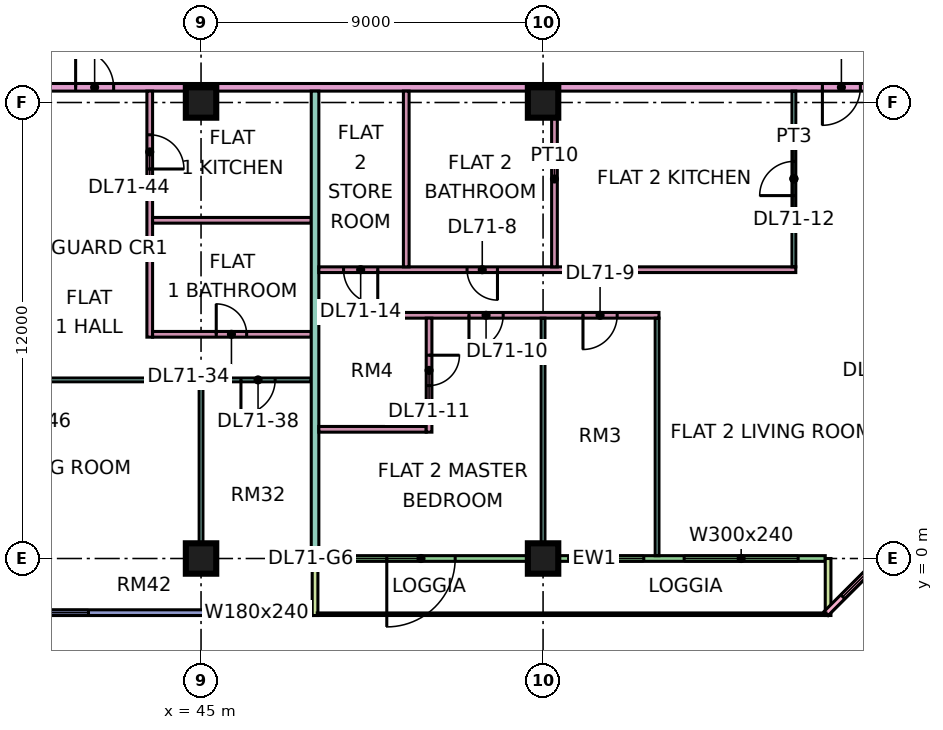
"""IFC4 building model, lengths in metres.
Left out: names, types, materials, properties, quantities, classifications, styles, units other than length and angle.
Written with IfcOpenShell. Run it as: python <this file> out.ifc"""

import sys

from ifc_helpers import new_model, si_unit, direction, frame, frame_2d, origin, origin_2d, place, context, subcontext, project, spatial, rectangle, extrude, element, fill, save


model = new_model("IFC4")
c1 = context("Model", 3, precision=1e-05, world=origin(), true_north=direction((0.0, 1.0)))
c2 = subcontext(c1, "Body", "Model", "MODEL_VIEW")
j1 = project(units=[si_unit("LENGTHUNIT", "METRE"), si_unit("PLANEANGLEUNIT", "RADIAN")], contexts=[c1])
p1 = place(None, origin())
s1 = spatial("IfcSite", under=j1, at=p1, CompositionType="ELEMENT")
p2 = place(p1, origin())
s2 = spatial("IfcBuilding", under=s1, at=p2, CompositionType="ELEMENT")
p3 = place(p2, frame((0.0, 0.0, 303.4)))
s3 = spatial("IfcBuildingStorey", under=s2, at=p3, CompositionType="ELEMENT", Elevation=303.4)
for number, where, z_axis, x_axis in (
    (1, (45.0, 0.0, 0.0), (0.0, 0.0, 1.0), (1.0, 0.0, 0.0)),
    (2, (45.0, 12.0, 0.0), (0.0, 0.0, 1.0), (1.0, 0.0, 0.0)),
    (3, (54.0, 0.0, 0.0), (0.0, 0.0, 1.0), (1.0, 0.0, 0.0)),
    (4, (54.0, 12.0, 0.0), (0.0, 0.0, 1.0), (1.0, 0.0, 0.0)),
):
    element("IfcColumn", number, at=place(p3, frame(where, z_axis=z_axis, x_axis=x_axis)), inside=s3, PredefinedType="COLUMN", context=c2, shape_type="SweptSolid", body=[
        extrude(rectangle(XDim=0.8, YDim=0.8, at=origin_2d()), origin(), (0.0, 0.0, 1.0), 3.75),
    ])
p4 = place(p3, frame((36.075, -1.425, 0.0), z_axis=(0.0, 0.0, 1.0), x_axis=(1.0, 0.0, 0.0)))
e5 = element("IfcWall", 5, at=p4, inside=s3, PredefinedType="SOLIDWALL", context=c2, shape_type="SweptSolid", body=[
    extrude(rectangle(XDim=11.85, YDim=0.15, at=frame_2d((5.925, 0.0))), origin(), (0.0, 0.0, 1.0), 3.35),
])
p5 = place(p4, frame((2.962, 0.0, 0.45)))
e6 = element("IfcOpeningElement", 6, at=p5, cuts=e5, PredefinedType="OPENING", context=c2, shape_type="SweptSolid", body=[
    extrude(rectangle(XDim=3.0, YDim=2.4, at=frame_2d((1.5, 1.2))), frame((0.0, 0.085, 0.0), z_axis=(0.0, -1.0, 0.0), x_axis=(1.0, 0.0, 0.0)), (0.0, 0.0, 1.0), 0.17),
])
p6 = place(p4, frame((9.488, 0.0, 0.45)))
e7 = element("IfcOpeningElement", 7, at=p6, cuts=e5, PredefinedType="OPENING", context=c2, shape_type="SweptSolid", body=[
    extrude(rectangle(XDim=1.8, YDim=2.4, at=frame_2d((0.9, 1.2))), frame((0.0, 0.085, 0.0), z_axis=(0.0, -1.0, 0.0), x_axis=(1.0, 0.0, 0.0)), (0.0, 0.0, 1.0), 0.17),
])
p7 = place(p3, frame((48.075, 0.0, 0.0), z_axis=(0.0, 0.0, 1.0), x_axis=(1.0, 0.0, 0.0)))
e8 = element("IfcWall", 8, at=p7, inside=s3, PredefinedType="SOLIDWALL", context=c2, shape_type="SweptSolid", body=[
    extrude(rectangle(XDim=13.35, YDim=0.15, at=frame_2d((6.675, 0.0))), origin(), (0.0, 0.0, 1.0), 3.35),
])
p8 = place(p7, frame((1.812, 0.0, 0.0)))
e9 = element("IfcOpeningElement", 9, at=p8, cuts=e8, PredefinedType="OPENING", context=c2, shape_type="SweptSolid", body=[
    extrude(rectangle(XDim=1.8, YDim=2.4, at=frame_2d((0.9, 1.2))), frame((0.0, 0.085, 0.0), z_axis=(0.0, -1.0, 0.0), x_axis=(1.0, 0.0, 0.0)), (0.0, 0.0, 1.0), 0.17),
])
p9 = place(p7, frame((6.775, 0.0, 0.45)))
e10 = element("IfcOpeningElement", 10, at=p9, cuts=e8, PredefinedType="OPENING", context=c2, shape_type="SweptSolid", body=[
    extrude(rectangle(XDim=1.8, YDim=2.4, at=frame_2d((0.9, 1.2))), frame((0.0, 0.085, 0.0), z_axis=(0.0, -1.0, 0.0), x_axis=(1.0, 0.0, 0.0)), (0.0, 0.0, 1.0), 0.17),
])
p10 = place(p7, frame((9.637, 0.0, 0.45)))
e11 = element("IfcOpeningElement", 11, at=p10, cuts=e8, PredefinedType="OPENING", context=c2, shape_type="SweptSolid", body=[
    extrude(rectangle(XDim=3.0, YDim=2.4, at=frame_2d((1.5, 1.2))), frame((0.0, 0.085, 0.0), z_axis=(0.0, -1.0, 0.0), x_axis=(1.0, 0.0, 0.0)), (0.0, 0.0, 1.0), 0.17),
])
for number, where, z_axis, x_axis in (
    (12, (48.0, -1.5, 0.0), (0.0, 0.0, 1.0), (0.0, 1.0, 0.0)),
    (13, (61.5, -1.5, 0.0), (0.0, 0.0, 1.0), (0.0, 1.0, 0.0)),
):
    element("IfcWall", number, at=place(p3, frame(where, z_axis=z_axis, x_axis=x_axis)), inside=s3, PredefinedType="SOLIDWALL", context=c2, shape_type="SweptSolid", body=[
        extrude(rectangle(XDim=1.5, YDim=0.15, at=frame_2d((0.75, 0.0))), origin(), (0.0, 0.0, 1.0), 3.35),
    ])
p11 = place(p3, frame((61.447, -1.447, 0.0), z_axis=(0.0, 0.0, 1.0), x_axis=(0.707106781187, 0.707106781187, 0.0)))
e14 = element("IfcWall", 14, at=p11, inside=s3, PredefinedType="SOLIDWALL", context=c2, shape_type="SweptSolid", body=[
    extrude(rectangle(XDim=4.243, YDim=0.15, at=frame_2d((2.121, 0.0))), origin(), (0.0, 0.0, 1.0), 3.35),
])
p12 = place(p11, frame((0.621, 0.0, 0.45)))
e15 = element("IfcOpeningElement", 15, at=p12, cuts=e14, PredefinedType="OPENING", context=c2, shape_type="SweptSolid", body=[
    extrude(rectangle(XDim=3.0, YDim=2.4, at=frame_2d((1.5, 1.2))), frame((0.0, 0.085, 0.0), z_axis=(0.0, -1.0, 0.0), x_axis=(1.0, 0.0, 0.0)), (0.0, 0.0, 1.0), 0.17),
])
p13 = place(p3, frame((33.05, 4.7, 0.0), z_axis=(0.0, 0.0, 1.0), x_axis=(1.0, 0.0, 0.0)))
e16 = element("IfcWall", 16, at=p13, inside=s3, PredefinedType="PARTITIONING", context=c2, shape_type="SweptSolid", body=[
    extrude(rectangle(XDim=14.85, YDim=0.1, at=frame_2d((7.425, 0.0))), origin(), (0.0, 0.0, 1.0), 3.35),
])
p14 = place(p13, frame((1.0, 0.0, 0.0)))
e17 = element("IfcOpeningElement", 17, at=p14, cuts=e16, PredefinedType="OPENING", context=c2, shape_type="SweptSolid", body=[
    extrude(rectangle(XDim=0.9, YDim=2.1, at=frame_2d((0.45, 1.05))), frame((0.0, 0.06, 0.0), z_axis=(0.0, -1.0, 0.0), x_axis=(1.0, 0.0, 0.0)), (0.0, 0.0, 1.0), 0.12),
])
p15 = place(p13, frame((13.0, 0.0, 0.0)))
e18 = element("IfcOpeningElement", 18, at=p15, cuts=e16, PredefinedType="OPENING", context=c2, shape_type="SweptSolid", body=[
    extrude(rectangle(XDim=0.9, YDim=2.1, at=frame_2d((0.45, 1.05))), frame((0.0, 0.06, 0.0), z_axis=(0.0, -1.0, 0.0), x_axis=(1.0, 0.0, 0.0)), (0.0, 0.0, 1.0), 0.12),
])
p16 = place(p13, frame((7.0, 0.0, 0.0)))
e19 = element("IfcOpeningElement", 19, at=p16, cuts=e16, PredefinedType="OPENING", context=c2, shape_type="SweptSolid", body=[
    extrude(rectangle(XDim=0.9, YDim=2.1, at=frame_2d((0.45, 1.05))), frame((0.0, 0.06, 0.0), z_axis=(0.0, -1.0, 0.0), x_axis=(1.0, 0.0, 0.0)), (0.0, 0.0, 1.0), 0.12),
])
p17 = place(p3, frame((40.65, 12.4, 0.0), z_axis=(0.0, 0.0, 1.0), x_axis=(1.0, 0.0, 0.0)))
e20 = element("IfcWall", 20, at=p17, inside=s3, PredefinedType="PARTITIONING", context=c2, shape_type="SweptSolid", body=[
    extrude(rectangle(XDim=22.35, YDim=0.2, at=frame_2d((11.175, 0.0))), origin(), (0.0, 0.0, 1.0), 3.35),
])
p18 = place(p17, frame((20.7, 0.0, 0.0)))
e21 = element("IfcOpeningElement", 21, at=p18, cuts=e20, PredefinedType="OPENING", context=c2, shape_type="SweptSolid", body=[
    extrude(rectangle(XDim=1.0, YDim=2.1, at=frame_2d((0.5, 1.05))), frame((0.0, 0.11, 0.0), z_axis=(0.0, -1.0, 0.0), x_axis=(1.0, 0.0, 0.0)), (0.0, 0.0, 1.0), 0.22),
])
p19 = place(p17, frame((1.05, 0.0, 0.0)))
e22 = element("IfcOpeningElement", 22, at=p19, cuts=e20, PredefinedType="OPENING", context=c2, shape_type="SweptSolid", body=[
    extrude(rectangle(XDim=1.0, YDim=2.1, at=frame_2d((0.5, 1.05))), frame((0.0, 0.11, 0.0), z_axis=(0.0, -1.0, 0.0), x_axis=(1.0, 0.0, 0.0)), (0.0, 0.0, 1.0), 0.22),
])
p20 = place(p3, frame((43.65, 5.825, 0.0), z_axis=(0.0, 0.0, 1.0), x_axis=(0.0, 1.0, 0.0)))
e23 = element("IfcWall", 23, at=p20, inside=s3, PredefinedType="PARTITIONING", context=c2, shape_type="SweptSolid", body=[
    extrude(rectangle(XDim=6.475, YDim=0.15, at=frame_2d((3.238, 0.0))), origin(), (0.0, 0.0, 1.0), 3.35),
])
p21 = place(p20, frame((4.425, 0.0, 0.0)))
e24 = element("IfcOpeningElement", 24, at=p21, cuts=e23, PredefinedType="OPENING", context=c2, shape_type="SweptSolid", body=[
    extrude(rectangle(XDim=0.9, YDim=2.1, at=frame_2d((0.45, 1.05))), frame((0.0, 0.085, 0.0), z_axis=(0.0, -1.0, 0.0), x_axis=(1.0, 0.0, 0.0)), (0.0, 0.0, 1.0), 0.17),
])
p22 = place(p3, frame((43.725, 5.9, 0.0), z_axis=(0.0, 0.0, 1.0), x_axis=(1.0, 0.0, 0.0)))
e25 = element("IfcWall", 25, at=p22, inside=s3, PredefinedType="PARTITIONING", context=c2, shape_type="SweptSolid", body=[
    extrude(rectangle(XDim=4.175, YDim=0.15, at=frame_2d((2.087, 0.0))), origin(), (0.0, 0.0, 1.0), 3.35),
])
p23 = place(p22, frame((1.675, 0.0, 0.0)))
e26 = element("IfcOpeningElement", 26, at=p23, cuts=e25, PredefinedType="OPENING", context=c2, shape_type="SweptSolid", body=[
    extrude(rectangle(XDim=0.8, YDim=2.1, at=frame_2d((0.4, 1.05))), frame((0.0, 0.085, 0.0), z_axis=(0.0, -1.0, 0.0), x_axis=(1.0, 0.0, 0.0)), (0.0, 0.0, 1.0), 0.17),
])
p24 = place(p3, frame((43.725, 8.9, 0.0), z_axis=(0.0, 0.0, 1.0), x_axis=(1.0, 0.0, 0.0)))
e27 = element("IfcWall", 27, at=p24, inside=s3, PredefinedType="PARTITIONING", context=c2, shape_type="SweptSolid", body=[
    extrude(rectangle(XDim=4.175, YDim=0.15, at=frame_2d((2.087, 0.0))), origin(), (0.0, 0.0, 1.0), 3.35),
])
p25 = place(p3, frame((45.0, 0.0, 0.0), z_axis=(0.0, 0.0, 1.0), x_axis=(0.0, 1.0, 0.0)))
e28 = element("IfcWall", 28, at=p25, inside=s3, PredefinedType="PARTITIONING", context=c2, shape_type="SweptSolid", body=[
    extrude(rectangle(XDim=4.65, YDim=0.1, at=frame_2d((2.325, 0.0))), origin(), (0.0, 0.0, 1.0), 3.35),
])
p26 = place(p3, frame((48.0, 0.0, 0.0), z_axis=(0.0, 0.0, 1.0), x_axis=(0.0, 1.0, 0.0)))
e29 = element("IfcWall", 29, at=p26, inside=s3, PredefinedType="PARTITIONING", context=c2, shape_type="SweptSolid", body=[
    extrude(rectangle(XDim=12.3, YDim=0.2, at=frame_2d((6.15, 0.0))), origin(), (0.0, 0.0, 1.0), 3.35),
])
p27 = place(p3, frame((48.1, 3.4, 0.0), z_axis=(0.0, 0.0, 1.0), x_axis=(1.0, 0.0, 0.0)))
e30 = element("IfcWall", 30, at=p27, inside=s3, PredefinedType="PARTITIONING", context=c2, shape_type="SweptSolid", body=[
    extrude(rectangle(XDim=2.825, YDim=0.15, at=frame_2d((1.413, 0.0))), origin(), (0.0, 0.0, 1.0), 3.35),
])
p28 = place(p3, frame((48.1, 6.4, 0.0), z_axis=(0.0, 0.0, 1.0), x_axis=(1.0, 0.0, 0.0)))
e31 = element("IfcWall", 31, at=p28, inside=s3, PredefinedType="PARTITIONING", context=c2, shape_type="SweptSolid", body=[
    extrude(rectangle(XDim=8.95, YDim=0.15, at=frame_2d((4.475, 0.0))), origin(), (0.0, 0.0, 1.0), 3.35),
])
p29 = place(p28, frame((6.95, 0.0, 0.0)))
e32 = element("IfcOpeningElement", 32, at=p29, cuts=e31, PredefinedType="OPENING", context=c2, shape_type="SweptSolid", body=[
    extrude(rectangle(XDim=0.9, YDim=2.1, at=frame_2d((0.45, 1.05))), frame((0.0, 0.085, 0.0), z_axis=(0.0, -1.0, 0.0), x_axis=(1.0, 0.0, 0.0)), (0.0, 0.0, 1.0), 0.17),
])
p30 = place(p28, frame((3.95, 0.0, 0.0)))
e33 = element("IfcOpeningElement", 33, at=p30, cuts=e31, PredefinedType="OPENING", context=c2, shape_type="SweptSolid", body=[
    extrude(rectangle(XDim=0.9, YDim=2.1, at=frame_2d((0.45, 1.05))), frame((0.0, 0.085, 0.0), z_axis=(0.0, -1.0, 0.0), x_axis=(1.0, 0.0, 0.0)), (0.0, 0.0, 1.0), 0.17),
])
p31 = place(p3, frame((48.1, 7.6, 0.0), z_axis=(0.0, 0.0, 1.0), x_axis=(1.0, 0.0, 0.0)))
e34 = element("IfcWall", 34, at=p31, inside=s3, PredefinedType="PARTITIONING", context=c2, shape_type="SweptSolid", body=[
    extrude(rectangle(XDim=12.55, YDim=0.15, at=frame_2d((6.275, 0.0))), origin(), (0.0, 0.0, 1.0), 3.35),
])
p32 = place(p31, frame((3.9, 0.0, 0.0)))
e35 = element("IfcOpeningElement", 35, at=p32, cuts=e34, PredefinedType="OPENING", context=c2, shape_type="SweptSolid", body=[
    extrude(rectangle(XDim=0.8, YDim=2.1, at=frame_2d((0.4, 1.05))), frame((0.0, 0.085, 0.0), z_axis=(0.0, -1.0, 0.0), x_axis=(1.0, 0.0, 0.0)), (0.0, 0.0, 1.0), 0.17),
])
p33 = place(p31, frame((0.65, 0.0, 0.0)))
e36 = element("IfcOpeningElement", 36, at=p33, cuts=e34, PredefinedType="OPENING", context=c2, shape_type="SweptSolid", body=[
    extrude(rectangle(XDim=0.9, YDim=2.1, at=frame_2d((0.45, 1.05))), frame((0.0, 0.085, 0.0), z_axis=(0.0, -1.0, 0.0), x_axis=(1.0, 0.0, 0.0)), (0.0, 0.0, 1.0), 0.17),
])
p34 = place(p3, frame((50.4, 7.675, 0.0), z_axis=(0.0, 0.0, 1.0), x_axis=(0.0, 1.0, 0.0)))
e37 = element("IfcWall", 37, at=p34, inside=s3, PredefinedType="PARTITIONING", context=c2, shape_type="SweptSolid", body=[
    extrude(rectangle(XDim=4.625, YDim=0.15, at=frame_2d((2.312, 0.0))), origin(), (0.0, 0.0, 1.0), 3.35),
])
p35 = place(p3, frame((51.0, 3.325, 0.0), z_axis=(0.0, 0.0, 1.0), x_axis=(0.0, 1.0, 0.0)))
e38 = element("IfcWall", 38, at=p35, inside=s3, PredefinedType="PARTITIONING", context=c2, shape_type="SweptSolid", body=[
    extrude(rectangle(XDim=3.0, YDim=0.15, at=frame_2d((1.5, 0.0))), origin(), (0.0, 0.0, 1.0), 3.35),
])
p36 = place(p35, frame((1.225, 0.0, 0.0)))
e39 = element("IfcOpeningElement", 39, at=p36, cuts=e38, PredefinedType="OPENING", context=c2, shape_type="SweptSolid", body=[
    extrude(rectangle(XDim=0.8, YDim=2.1, at=frame_2d((0.4, 1.05))), frame((0.0, 0.085, 0.0), z_axis=(0.0, -1.0, 0.0), x_axis=(1.0, 0.0, 0.0)), (0.0, 0.0, 1.0), 0.17),
])
p37 = place(p3, frame((54.0, 0.074, 0.0), z_axis=(0.0, 0.0, 1.0), x_axis=(0.0, 1.0, 0.0)))
e40 = element("IfcWall", 40, at=p37, inside=s3, PredefinedType="PARTITIONING", context=c2, shape_type="SweptSolid", body=[
    extrude(rectangle(XDim=6.251, YDim=0.1, at=frame_2d((3.125, 0.0))), origin(), (0.0, 0.0, 1.0), 3.35),
])
p38 = place(p3, frame((54.3, 7.675, 0.0), z_axis=(0.0, 0.0, 1.0), x_axis=(0.0, 1.0, 0.0)))
e41 = element("IfcWall", 41, at=p38, inside=s3, PredefinedType="PARTITIONING", context=c2, shape_type="SweptSolid", body=[
    extrude(rectangle(XDim=4.625, YDim=0.15, at=frame_2d((2.312, 0.0))), origin(), (0.0, 0.0, 1.0), 3.35),
])
p39 = place(p3, frame((57.0, 0.074, 0.0), z_axis=(0.0, 0.0, 1.0), x_axis=(0.0, 1.0, 0.0)))
e42 = element("IfcWall", 42, at=p39, inside=s3, PredefinedType="PARTITIONING", context=c2, shape_type="SweptSolid", body=[
    extrude(rectangle(XDim=6.251, YDim=0.1, at=frame_2d((3.125, 0.0))), origin(), (0.0, 0.0, 1.0), 3.35),
])
p40 = place(p3, frame((60.6, 7.675, 0.0), z_axis=(0.0, 0.0, 1.0), x_axis=(0.0, 1.0, 0.0)))
e43 = element("IfcWall", 43, at=p40, inside=s3, PredefinedType="PARTITIONING", context=c2, shape_type="SweptSolid", body=[
    extrude(rectangle(XDim=4.625, YDim=0.1, at=frame_2d((2.312, 0.0))), origin(), (0.0, 0.0, 1.0), 3.35),
])
p41 = place(p40, frame((1.875, 0.0, 0.0)))
e44 = element("IfcOpeningElement", 44, at=p41, cuts=e43, PredefinedType="OPENING", context=c2, shape_type="SweptSolid", body=[
    extrude(rectangle(XDim=0.9, YDim=2.1, at=frame_2d((0.45, 1.05))), frame((0.0, 0.06, 0.0), z_axis=(0.0, -1.0, 0.0), x_axis=(1.0, 0.0, 0.0)), (0.0, 0.0, 1.0), 0.12),
])
p42 = place(p5, origin())
e45 = element("IfcWindow", 45, at=p42, inside=s3, PartitioningType="SINGLE_PANEL", PredefinedType="WINDOW", context=c2, shape_type="SweptSolid", body=[
    extrude(rectangle(XDim=3.0, YDim=2.4, at=frame_2d((1.5, 1.2))), frame((0.0, 0.03, 0.0), z_axis=(0.0, -1.0, 0.0), x_axis=(1.0, 0.0, 0.0)), (0.0, 0.0, 1.0), 0.06),
])
fill(e6, e45)
p43 = place(p6, origin())
e46 = element("IfcWindow", 46, at=p43, inside=s3, PartitioningType="SINGLE_PANEL", PredefinedType="WINDOW", context=c2, shape_type="SweptSolid", body=[
    extrude(rectangle(XDim=1.8, YDim=2.4, at=frame_2d((0.9, 1.2))), frame((0.0, 0.03, 0.0), z_axis=(0.0, -1.0, 0.0), x_axis=(1.0, 0.0, 0.0)), (0.0, 0.0, 1.0), 0.06),
])
fill(e7, e46)
p44 = place(p8, frame((1.8, 0.0, 0.0), z_axis=(0.0, 0.0, 1.0), x_axis=(-1.0, 0.0, 0.0)))
e47 = element("IfcDoor", 47, at=p44, inside=s3, OperationType="DOUBLE_DOOR_SINGLE_SWING", PredefinedType="DOOR", context=c2, shape_type="SweptSolid", body=[
    extrude(rectangle(XDim=1.8, YDim=2.4, at=frame_2d((0.9, 1.2))), frame((0.0, 0.025, 0.0), z_axis=(0.0, -1.0, 0.0), x_axis=(1.0, 0.0, 0.0)), (0.0, 0.0, 1.0), 0.05),
])
fill(e9, e47)
p45 = place(p9, origin())
e48 = element("IfcWindow", 48, at=p45, inside=s3, PartitioningType="SINGLE_PANEL", PredefinedType="WINDOW", context=c2, shape_type="SweptSolid", body=[
    extrude(rectangle(XDim=1.8, YDim=2.4, at=frame_2d((0.9, 1.2))), frame((0.0, 0.03, 0.0), z_axis=(0.0, -1.0, 0.0), x_axis=(1.0, 0.0, 0.0)), (0.0, 0.0, 1.0), 0.06),
])
fill(e10, e48)
p46 = place(p10, origin())
e49 = element("IfcWindow", 49, at=p46, inside=s3, PartitioningType="SINGLE_PANEL", PredefinedType="WINDOW", context=c2, shape_type="SweptSolid", body=[
    extrude(rectangle(XDim=3.0, YDim=2.4, at=frame_2d((1.5, 1.2))), frame((0.0, 0.03, 0.0), z_axis=(0.0, -1.0, 0.0), x_axis=(1.0, 0.0, 0.0)), (0.0, 0.0, 1.0), 0.06),
])
fill(e11, e49)
p47 = place(p12, origin())
e50 = element("IfcWindow", 50, at=p47, inside=s3, PartitioningType="SINGLE_PANEL", PredefinedType="WINDOW", context=c2, shape_type="SweptSolid", body=[
    extrude(rectangle(XDim=3.0, YDim=2.4, at=frame_2d((1.5, 1.2))), frame((0.0, 0.03, 0.0), z_axis=(0.0, -1.0, 0.0), x_axis=(1.0, 0.0, 0.0)), (0.0, 0.0, 1.0), 0.06),
])
fill(e15, e50)
p48 = place(p32, origin())
e51 = element("IfcDoor", 51, at=p48, inside=s3, OperationType="SINGLE_SWING_RIGHT", PredefinedType="DOOR", context=c2, shape_type="SweptSolid", body=[
    extrude(rectangle(XDim=0.8, YDim=2.1, at=frame_2d((0.4, 1.05))), frame((0.0, 0.025, 0.0), z_axis=(0.0, -1.0, 0.0), x_axis=(1.0, 0.0, 0.0)), (0.0, 0.0, 1.0), 0.05),
])
fill(e35, e51)
p49 = place(p29, frame((0.9, 0.0, 0.0), z_axis=(0.0, 0.0, 1.0), x_axis=(-1.0, 0.0, 0.0)))
e52 = element("IfcDoor", 52, at=p49, inside=s3, OperationType="SINGLE_SWING_LEFT", PredefinedType="DOOR", context=c2, shape_type="SweptSolid", body=[
    extrude(rectangle(XDim=0.9, YDim=2.1, at=frame_2d((0.45, 1.05))), frame((0.0, 0.025, 0.0), z_axis=(0.0, -1.0, 0.0), x_axis=(1.0, 0.0, 0.0)), (0.0, 0.0, 1.0), 0.05),
])
fill(e32, e52)
p50 = place(p30, frame((0.9, 0.0, 0.0), z_axis=(0.0, 0.0, 1.0), x_axis=(-1.0, 0.0, 0.0)))
e53 = element("IfcDoor", 53, at=p50, inside=s3, OperationType="SINGLE_SWING_LEFT", PredefinedType="DOOR", context=c2, shape_type="SweptSolid", body=[
    extrude(rectangle(XDim=0.9, YDim=2.1, at=frame_2d((0.45, 1.05))), frame((0.0, 0.025, 0.0), z_axis=(0.0, -1.0, 0.0), x_axis=(1.0, 0.0, 0.0)), (0.0, 0.0, 1.0), 0.05),
])
fill(e33, e53)
p51 = place(p36, origin())
e54 = element("IfcDoor", 54, at=p51, inside=s3, OperationType="SINGLE_SWING_RIGHT", PredefinedType="DOOR", context=c2, shape_type="SweptSolid", body=[
    extrude(rectangle(XDim=0.8, YDim=2.1, at=frame_2d((0.4, 1.05))), frame((0.0, 0.025, 0.0), z_axis=(0.0, -1.0, 0.0), x_axis=(1.0, 0.0, 0.0)), (0.0, 0.0, 1.0), 0.05),
])
fill(e39, e54)
p52 = place(p41, origin())
e55 = element("IfcDoor", 55, at=p52, inside=s3, OperationType="SINGLE_SWING_LEFT", PredefinedType="DOOR", context=c2, shape_type="SweptSolid", body=[
    extrude(rectangle(XDim=0.9, YDim=2.1, at=frame_2d((0.45, 1.05))), frame((0.0, 0.025, 0.0), z_axis=(0.0, -1.0, 0.0), x_axis=(1.0, 0.0, 0.0)), (0.0, 0.0, 1.0), 0.05),
])
fill(e44, e55)
p53 = place(p18, frame((1.0, 0.0, 0.0), z_axis=(0.0, 0.0, 1.0), x_axis=(-1.0, 0.0, 0.0)))
e56 = element("IfcDoor", 56, at=p53, inside=s3, OperationType="SINGLE_SWING_LEFT", PredefinedType="DOOR", context=c2, shape_type="SweptSolid", body=[
    extrude(rectangle(XDim=1.0, YDim=2.1, at=frame_2d((0.5, 1.05))), frame((0.0, 0.025, 0.0), z_axis=(0.0, -1.0, 0.0), x_axis=(1.0, 0.0, 0.0)), (0.0, 0.0, 1.0), 0.05),
])
fill(e21, e56)
p54 = place(p33, origin())
e57 = element("IfcDoor", 57, at=p54, inside=s3, OperationType="SINGLE_SWING_RIGHT", PredefinedType="DOOR", context=c2, shape_type="SweptSolid", body=[
    extrude(rectangle(XDim=0.9, YDim=2.1, at=frame_2d((0.45, 1.05))), frame((0.0, 0.025, 0.0), z_axis=(0.0, -1.0, 0.0), x_axis=(1.0, 0.0, 0.0)), (0.0, 0.0, 1.0), 0.05),
])
fill(e36, e57)
p55 = place(p23, origin())
e58 = element("IfcDoor", 58, at=p55, inside=s3, OperationType="SINGLE_SWING_LEFT", PredefinedType="DOOR", context=c2, shape_type="SweptSolid", body=[
    extrude(rectangle(XDim=0.8, YDim=2.1, at=frame_2d((0.4, 1.05))), frame((0.0, 0.025, 0.0), z_axis=(0.0, -1.0, 0.0), x_axis=(1.0, 0.0, 0.0)), (0.0, 0.0, 1.0), 0.05),
])
fill(e26, e58)
p56 = place(p15, frame((0.9, 0.0, 0.0), z_axis=(0.0, 0.0, 1.0), x_axis=(-1.0, 0.0, 0.0)))
e59 = element("IfcDoor", 59, at=p56, inside=s3, OperationType="SINGLE_SWING_LEFT", PredefinedType="DOOR", context=c2, shape_type="SweptSolid", body=[
    extrude(rectangle(XDim=0.9, YDim=2.1, at=frame_2d((0.45, 1.05))), frame((0.0, 0.025, 0.0), z_axis=(0.0, -1.0, 0.0), x_axis=(1.0, 0.0, 0.0)), (0.0, 0.0, 1.0), 0.05),
])
fill(e18, e59)
p57 = place(p19, origin())
e60 = element("IfcDoor", 60, at=p57, inside=s3, OperationType="SINGLE_SWING_LEFT", PredefinedType="DOOR", context=c2, shape_type="SweptSolid", body=[
    extrude(rectangle(XDim=1.0, YDim=2.1, at=frame_2d((0.5, 1.05))), frame((0.0, 0.025, 0.0), z_axis=(0.0, -1.0, 0.0), x_axis=(1.0, 0.0, 0.0)), (0.0, 0.0, 1.0), 0.05),
])
fill(e22, e60)
p58 = place(p21, frame((0.9, 0.0, 0.0), z_axis=(0.0, 0.0, 1.0), x_axis=(-1.0, 0.0, 0.0)))
e61 = element("IfcDoor", 61, at=p58, inside=s3, OperationType="SINGLE_SWING_LEFT", PredefinedType="DOOR", context=c2, shape_type="SweptSolid", body=[
    extrude(rectangle(XDim=0.9, YDim=2.1, at=frame_2d((0.45, 1.05))), frame((0.0, 0.025, 0.0), z_axis=(0.0, -1.0, 0.0), x_axis=(1.0, 0.0, 0.0)), (0.0, 0.0, 1.0), 0.05),
])
fill(e24, e61)
save(model, sys.argv[1])
